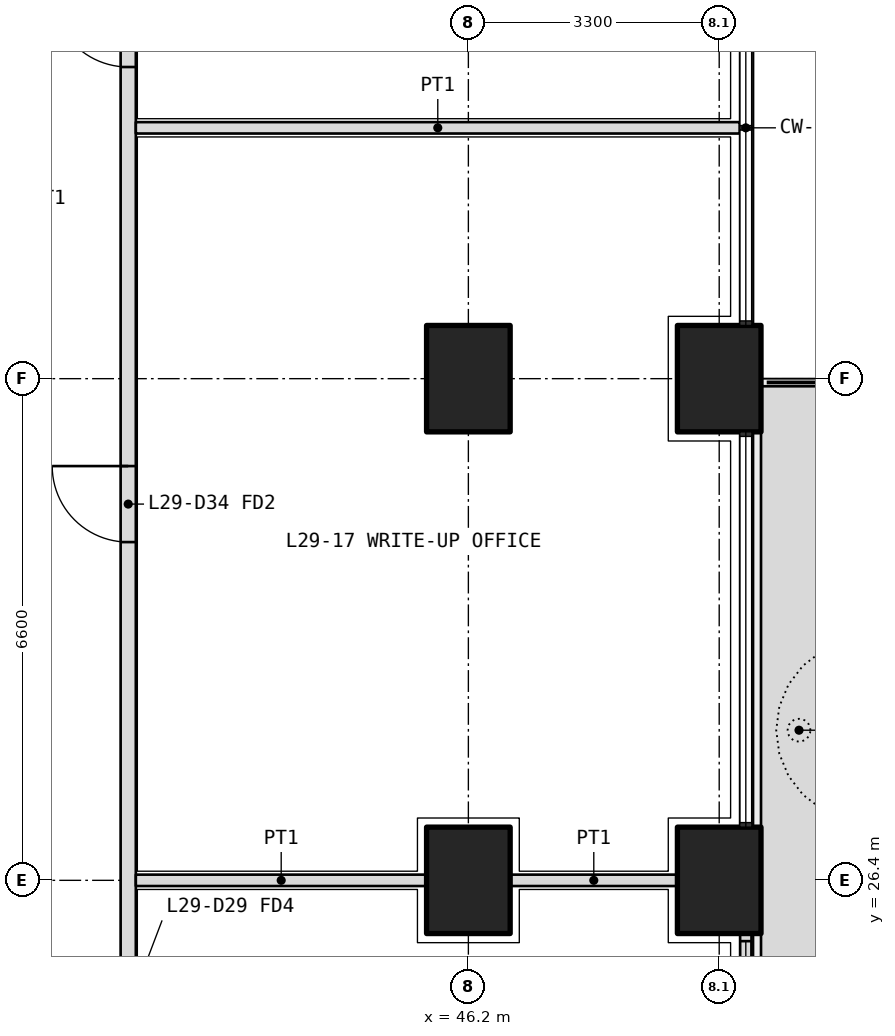
"""IFC4 building model, lengths in metres.
Left out: names, types, materials, properties, quantities, classifications, styles, units other than length and angle.
Written with IfcOpenShell. Run it as: python <this file> out.ifc"""

import sys

from ifc_helpers import new_model, si_unit, direction, frame, frame_2d, origin, origin_2d, place, context, subcontext, project, spatial, polyline, rectangle, outline, extrude, element, fill, save


model = new_model("IFC4")
c1 = context("Model", 3, precision=1e-05, world=origin(), true_north=direction((0.0, 1.0)))
c2 = subcontext(c1, "Body", "Model", "MODEL_VIEW")
j1 = project(units=[si_unit("LENGTHUNIT", "METRE"), si_unit("PLANEANGLEUNIT", "RADIAN")], contexts=[c1])
p1 = place(None, origin())
s1 = spatial("IfcSite", under=j1, at=p1, CompositionType="ELEMENT")
p2 = place(p1, origin())
s2 = spatial("IfcBuilding", under=s1, at=p2, CompositionType="ELEMENT")
p3 = place(p2, frame((0.0, 0.0, 128.4)))
s3 = spatial("IfcBuildingStorey", under=s2, at=p3, CompositionType="ELEMENT", Elevation=128.4)
for number, where, z_axis, x_axis in (
    (1, (49.5, 26.4, 0.0), (0.0, 0.0, 1.0), (0.0, 1.0, 0.0)),
    (2, (49.5, 33.0, 0.0), (0.0, 0.0, 1.0), (0.0, 1.0, 0.0)),
    (3, (46.2, 26.4, 0.0), (0.0, 0.0, 1.0), (0.0, 1.0, 0.0)),
    (4, (46.2, 33.0, 0.0), (0.0, 0.0, 1.0), (0.0, 1.0, 0.0)),
):
    element("IfcColumn", number, at=place(p3, frame(where, z_axis=z_axis, x_axis=x_axis)), inside=s3, PredefinedType="COLUMN", context=c2, shape_type="SweptSolid", body=[
        extrude(rectangle(XDim=1.4, YDim=1.1, at=origin_2d()), origin(), (0.0, 0.0, 1.0), 4.2),
    ])
p4 = place(p3, origin())
e5 = element("IfcWall", 5, at=p4, inside=s3, PredefinedType="USERDEFINED", context=c2, shape_type="SweptSolid", body=[
    extrude(outline(polyline([(50.05, 23.85), (51.05, 23.85), (51.05, 32.9), (50.05, 32.9), (50.05, 23.85)]), holes=[polyline([(50.2, 24.0), (50.9, 24.0), (50.9, 32.75), (50.2, 32.75), (50.2, 24.0)])]), origin(), (0.0, 0.0, 1.0), 1.05),
])
p5 = place(p3, frame((49.85, 20.5, 0.0), z_axis=(0.0, 0.0, 1.0), x_axis=(0.0, 1.0, 0.0)))
e6 = element("IfcWall", 6, at=p5, inside=s3, PredefinedType="SOLIDWALL", context=c2, shape_type="SweptSolid", body=[
    extrude(rectangle(XDim=5.2, YDim=0.15, at=frame_2d((2.6, 0.0))), origin(), (0.0, 0.0, 1.0), 2.7),
])
p6 = place(p5, frame((2.85, 0.0, 0.0)))
e7 = element("IfcOpeningElement", 7, at=p6, cuts=e6, PredefinedType="OPENING", context=c2, shape_type="SweptSolid", body=[
    extrude(rectangle(XDim=1.0, YDim=2.4, at=frame_2d((0.5, 1.2))), frame((0.0, 0.085, 0.0), z_axis=(0.0, -1.0, 0.0), x_axis=(1.0, 0.0, 0.0)), (0.0, 0.0, 1.0), 0.17),
])
p7 = place(p5, frame((0.1, 0.0, 0.1)))
e8 = element("IfcOpeningElement", 8, at=p7, cuts=e6, PredefinedType="OPENING", context=c2, shape_type="SweptSolid", body=[
    extrude(rectangle(XDim=2.25, YDim=2.3, at=frame_2d((1.125, 1.15))), frame((0.0, 0.085, 0.0), z_axis=(0.0, -1.0, 0.0), x_axis=(1.0, 0.0, 0.0)), (0.0, 0.0, 1.0), 0.17),
])
p8 = place(p5, frame((3.95, 0.0, 0.1)))
e9 = element("IfcOpeningElement", 9, at=p8, cuts=e6, PredefinedType="OPENING", context=c2, shape_type="SweptSolid", body=[
    extrude(rectangle(XDim=1.15, YDim=2.3, at=frame_2d((0.575, 1.15))), frame((0.0, 0.085, 0.0), z_axis=(0.0, -1.0, 0.0), x_axis=(1.0, 0.0, 0.0)), (0.0, 0.0, 1.0), 0.17),
])
p9 = place(p3, frame((41.725, 11.175, 0.0), z_axis=(0.0, 0.0, 1.0), x_axis=(0.0, 1.0, 0.0)))
e10 = element("IfcWall", 10, at=p9, inside=s3, PredefinedType="PARTITIONING", context=c2, shape_type="SweptSolid", body=[
    extrude(rectangle(XDim=27.625, YDim=0.2, at=frame_2d((13.812, 0.0))), origin(), (0.0, 0.0, 1.0), 2.85),
])
p10 = place(p9, frame((3.762, 0.0, 0.0)))
e11 = element("IfcOpeningElement", 11, at=p10, cuts=e10, PredefinedType="OPENING", context=c2, shape_type="SweptSolid", body=[
    extrude(rectangle(XDim=1.0, YDim=2.1, at=frame_2d((0.5, 1.05))), frame((0.0, 0.11, 0.0), z_axis=(0.0, -1.0, 0.0), x_axis=(1.0, 0.0, 0.0)), (0.0, 0.0, 1.0), 0.22),
])
p11 = place(p9, frame((9.725, 0.0, 0.0)))
e12 = element("IfcOpeningElement", 12, at=p11, cuts=e10, PredefinedType="OPENING", context=c2, shape_type="SweptSolid", body=[
    extrude(rectangle(XDim=1.0, YDim=2.1, at=frame_2d((0.5, 1.05))), frame((0.0, 0.11, 0.0), z_axis=(0.0, -1.0, 0.0), x_axis=(1.0, 0.0, 0.0)), (0.0, 0.0, 1.0), 0.22),
])
p12 = place(p9, frame((13.075, 0.0, 0.0)))
e13 = element("IfcOpeningElement", 13, at=p12, cuts=e10, PredefinedType="OPENING", context=c2, shape_type="SweptSolid", body=[
    extrude(rectangle(XDim=0.9, YDim=2.1, at=frame_2d((0.45, 1.05))), frame((0.0, 0.11, 0.0), z_axis=(0.0, -1.0, 0.0), x_axis=(1.0, 0.0, 0.0)), (0.0, 0.0, 1.0), 0.22),
])
p13 = place(p9, frame((19.675, 0.0, 0.0)))
e14 = element("IfcOpeningElement", 14, at=p13, cuts=e10, PredefinedType="OPENING", context=c2, shape_type="SweptSolid", body=[
    extrude(rectangle(XDim=1.0, YDim=2.1, at=frame_2d((0.5, 1.05))), frame((0.0, 0.11, 0.0), z_axis=(0.0, -1.0, 0.0), x_axis=(1.0, 0.0, 0.0)), (0.0, 0.0, 1.0), 0.22),
])
p14 = place(p9, frame((25.925, 0.0, 0.0)))
e15 = element("IfcOpeningElement", 15, at=p14, cuts=e10, PredefinedType="OPENING", context=c2, shape_type="SweptSolid", body=[
    extrude(rectangle(XDim=1.0, YDim=2.1, at=frame_2d((0.5, 1.05))), frame((0.0, 0.11, 0.0), z_axis=(0.0, -1.0, 0.0), x_axis=(1.0, 0.0, 0.0)), (0.0, 0.0, 1.0), 0.22),
])
p15 = place(p3, frame((48.95, 26.4, 0.0), z_axis=(0.0, 0.0, 1.0), x_axis=(-1.0, 0.0, 0.0)))
e16 = element("IfcWall", 16, at=p15, inside=s3, PredefinedType="PARTITIONING", context=c2, shape_type="SweptSolid", body=[
    extrude(rectangle(XDim=2.2, YDim=0.15, at=frame_2d((1.1, 0.0))), origin(), (0.0, 0.0, 1.0), 2.85),
])
p16 = place(p3, frame((45.65, 26.4, 0.0), z_axis=(0.0, 0.0, 1.0), x_axis=(-1.0, 0.0, 0.0)))
e17 = element("IfcWall", 17, at=p16, inside=s3, PredefinedType="PARTITIONING", context=c2, shape_type="SweptSolid", body=[
    extrude(rectangle(XDim=3.825, YDim=0.15, at=frame_2d((1.913, 0.0))), origin(), (0.0, 0.0, 1.0), 2.85),
])
p17 = place(p3, frame((49.77, 36.3, 0.0), z_axis=(0.0, 0.0, 1.0), x_axis=(-1.0, 0.0, 0.0)))
e18 = element("IfcWall", 18, at=p17, inside=s3, PredefinedType="PARTITIONING", context=c2, shape_type="SweptSolid", body=[
    extrude(rectangle(XDim=7.945, YDim=0.15, at=frame_2d((3.973, 0.0))), origin(), (0.0, 0.0, 1.0), 2.7),
])
p18 = place(p8, origin())
e19 = element("IfcWindow", 19, at=p18, inside=s3, PartitioningType="SINGLE_PANEL", PredefinedType="WINDOW", context=c2, shape_type="SweptSolid", body=[
    extrude(rectangle(XDim=1.15, YDim=2.3, at=frame_2d((0.575, 1.15))), frame((0.0, 0.03, 0.0), z_axis=(0.0, -1.0, 0.0), x_axis=(1.0, 0.0, 0.0)), (0.0, 0.0, 1.0), 0.06),
])
fill(e9, e19)
p19 = place(p13, origin())
e20 = element("IfcDoor", 20, at=p19, inside=s3, OperationType="SINGLE_SWING_RIGHT", PredefinedType="DOOR", context=c2, shape_type="SweptSolid", body=[
    extrude(rectangle(XDim=1.0, YDim=2.1, at=frame_2d((0.5, 1.05))), frame((0.0, 0.025, 0.0), z_axis=(0.0, -1.0, 0.0), x_axis=(1.0, 0.0, 0.0)), (0.0, 0.0, 1.0), 0.05),
])
fill(e14, e20)
p20 = place(p14, origin())
e21 = element("IfcDoor", 21, at=p20, inside=s3, OperationType="SINGLE_SWING_RIGHT", PredefinedType="DOOR", context=c2, shape_type="SweptSolid", body=[
    extrude(rectangle(XDim=1.0, YDim=2.1, at=frame_2d((0.5, 1.05))), frame((0.0, 0.025, 0.0), z_axis=(0.0, -1.0, 0.0), x_axis=(1.0, 0.0, 0.0)), (0.0, 0.0, 1.0), 0.05),
])
fill(e15, e21)
save(model, sys.argv[1])
